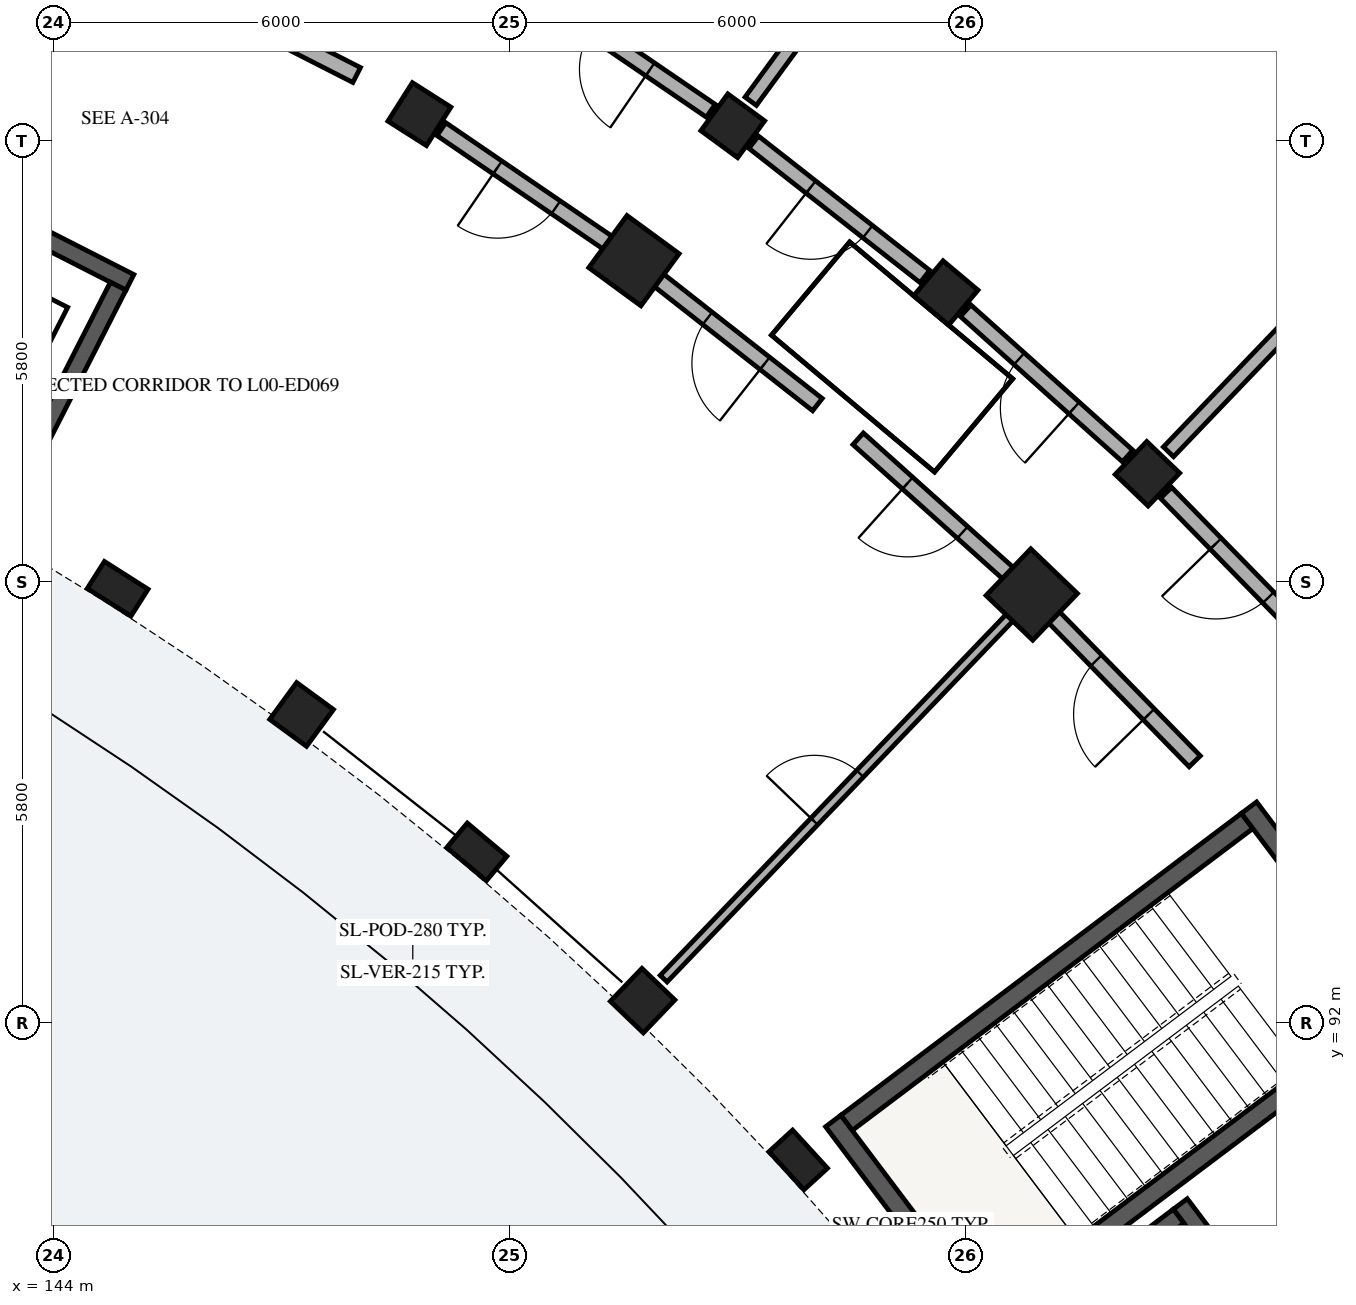
"""IFC4 building model, lengths in metres.
Left out: names, types, materials, properties, quantities, classifications, styles, units other than length and angle.
Written with IfcOpenShell. Run it as: python <this file> out.ifc"""

import sys

from ifc_helpers import new_model, si_unit, direction, frame, frame_2d, origin, origin_2d, place, context, subcontext, project, spatial, rectangle, extrude, element, fill, save


model = new_model("IFC4")
c1 = context("Model", 3, precision=1e-05, world=origin(), true_north=direction((0.0, 1.0)))
c2 = subcontext(c1, "Body", "Model", "MODEL_VIEW")
j1 = project(units=[si_unit("LENGTHUNIT", "METRE"), si_unit("PLANEANGLEUNIT", "RADIAN")], contexts=[c1])
p1 = place(None, origin())
s1 = spatial("IfcSite", under=j1, at=p1, CompositionType="ELEMENT")
p2 = place(p1, origin())
s2 = spatial("IfcBuilding", under=s1, at=p2, CompositionType="ELEMENT")
p3 = place(p2, origin())
s3 = spatial("IfcBuildingStorey", under=s2, at=p3, CompositionType="ELEMENT", Elevation=0.0)
p4 = place(p3, frame((159.707, 94.658, 0.0), z_axis=(0.0, 0.0, 1.0), x_axis=(-0.798639633744, -0.601809550782, 0.0)))
e1 = element("IfcWall", 1, at=p4, inside=s3, PredefinedType="SHEAR", context=c2, shape_type="SweptSolid", body=[
    extrude(rectangle(XDim=6.6, YDim=0.25, at=frame_2d((3.3, 0.0))), origin(), (0.0, 0.0, 1.0), 4.48),
])
p5 = place(p3, frame((154.261, 90.711, 0.0), z_axis=(0.0, 0.0, 1.0), x_axis=(0.601825826579, -0.798627368967, 0.0)))
e2 = element("IfcWall", 2, at=p5, inside=s3, PredefinedType="SHEAR", context=c2, shape_type="SweptSolid", body=[
    extrude(rectangle(XDim=3.42, YDim=0.25, at=frame_2d((1.71, 0.0))), origin(), (0.0, 0.0, 1.0), 4.48),
])
p6 = place(p3, frame((159.731, 94.833, 0.0), z_axis=(0.0, 0.0, 1.0), x_axis=(0.601814606132, -0.798635824294, 0.0)))
e3 = element("IfcWall", 3, at=p6, inside=s3, PredefinedType="SHEAR", context=c2, shape_type="SweptSolid", body=[
    extrude(rectangle(XDim=3.42, YDim=0.25, at=frame_2d((1.71, 0.0))), origin(), (0.0, 0.0, 1.0), 4.48),
])
p7 = place(p3, frame((161.615, 92.126, 0.0), z_axis=(0.0, 0.0, 1.0), x_axis=(-0.798639633744, -0.601809550782, 0.0)))
e4 = element("IfcWall", 4, at=p7, inside=s3, PredefinedType="SHEAR", context=c2, shape_type="SweptSolid", body=[
    extrude(rectangle(XDim=6.6, YDim=0.25, at=frame_2d((3.3, 0.0))), origin(), (0.0, 0.0, 1.0), 4.48),
])
p8 = place(p7, frame((0.22, 0.0, 0.0)))
e5 = element("IfcOpeningElement", 5, at=p8, cuts=e4, PredefinedType="OPENING", context=c2, shape_type="SweptSolid", body=[
    extrude(rectangle(XDim=1.05, YDim=2.15, at=frame_2d((0.525, 1.075))), frame((0.0, 0.135, 0.0), z_axis=(0.0, -1.0, 0.0), x_axis=(1.0, 0.0, 0.0)), (0.0, 0.0, 1.0), 0.27),
])
p9 = place(p3, frame((158.827, 89.619, 0.0), z_axis=(0.0, 0.0, 1.0), x_axis=(0.601819781152, -0.798631924615, 0.0)))
e6 = element("IfcWall", 6, at=p9, inside=s3, PredefinedType="SHEAR", context=c2, shape_type="SweptSolid", body=[
    extrude(rectangle(XDim=3.26, YDim=0.23, at=frame_2d((1.63, 0.0))), origin(), (0.0, 0.0, 1.0), 4.48),
])
p10 = place(p9, frame((0.9, 0.0, 0.0)))
e7 = element("IfcOpeningElement", 7, at=p10, cuts=e6, PredefinedType="OPENING", context=c2, shape_type="SweptSolid", body=[
    extrude(rectangle(XDim=1.1, YDim=2.15, at=frame_2d((0.55, 1.075))), frame((0.0, 0.125, 0.0), z_axis=(0.0, -1.0, 0.0), x_axis=(1.0, 0.0, 0.0)), (0.0, 0.0, 1.0), 0.25),
])
p11 = place(p3, frame((158.805, 89.458, 0.0), z_axis=(0.0, 0.0, 1.0), x_axis=(-0.798608971494, -0.601850239387, 0.0)))
e8 = element("IfcWall", 8, at=p11, inside=s3, PredefinedType="SHEAR", context=c2, shape_type="SweptSolid", body=[
    extrude(rectangle(XDim=2.7, YDim=0.23, at=frame_2d((1.35, 0.0))), origin(), (0.0, 0.0, 1.0), 4.48),
])
p12 = place(p3, frame((142.103, 103.224, 0.0), z_axis=(0.0, 0.0, 1.0), x_axis=(0.891001200497, -0.454000947921, 0.0)))
e9 = element("IfcWall", 9, at=p12, inside=s3, PredefinedType="SHEAR", context=c2, shape_type="SweptSolid", body=[
    extrude(rectangle(XDim=3.26, YDim=0.23, at=frame_2d((1.63, 0.0))), origin(), (0.0, 0.0, 1.0), 4.48),
])
p13 = place(p12, frame((0.9, 0.0, 0.0)))
e10 = element("IfcOpeningElement", 10, at=p13, cuts=e9, PredefinedType="OPENING", context=c2, shape_type="SweptSolid", body=[
    extrude(rectangle(XDim=1.0, YDim=2.15, at=frame_2d((0.5, 1.075))), frame((0.0, 0.125, 0.0), z_axis=(0.0, -1.0, 0.0), x_axis=(1.0, 0.0, 0.0)), (0.0, 0.0, 1.0), 0.25),
])
p14 = place(p3, frame((144.853, 101.694, 0.0), z_axis=(0.0, 0.0, 1.0), x_axis=(-0.454036857101, -0.890982902414, 0.0)))
e11 = element("IfcWall", 11, at=p14, inside=s3, PredefinedType="SHEAR", context=c2, shape_type="SweptSolid", body=[
    extrude(rectangle(XDim=2.7, YDim=0.23, at=frame_2d((1.35, 0.0))), origin(), (0.0, 0.0, 1.0), 4.48),
])
p15 = place(p3, frame((153.801, 90.198, 0.0), z_axis=(0.0, 0.0, 1.0), x_axis=(0.73793204255, 0.674875025896, 0.0)))
e12 = element("IfcColumn", 12, at=p15, inside=s3, PredefinedType="PILASTER", context=c2, shape_type="SweptSolid", body=[
    extrude(rectangle(XDim=0.42, YDim=0.68, at=origin_2d()), origin(), (0.0, 0.0, 1.0), 4.485),
])
p16 = place(p3, frame((151.753, 92.294, 0.0), z_axis=(0.0, 0.0, 1.0), x_axis=(0.691863164029, 0.722028643656, 0.0)))
e13 = element("IfcColumn", 13, at=p16, inside=s3, PredefinedType="COLUMN", context=c2, shape_type="SweptSolid", body=[
    extrude(rectangle(XDim=0.6, YDim=0.6, at=origin_2d()), origin(), (0.0, 0.0, 1.0), 4.485),
])
p17 = place(p3, frame((156.873, 97.637, 0.0), z_axis=(0.0, 0.0, 1.0), x_axis=(0.691863164029, 0.722028643656, 0.0)))
e14 = element("IfcColumn", 14, at=p17, inside=s3, PredefinedType="COLUMN", context=c2, shape_type="SweptSolid", body=[
    extrude(rectangle(XDim=0.85, YDim=0.85, at=origin_2d()), origin(), (0.0, 0.0, 1.0), 4.485),
])
p18 = place(p3, frame((158.395, 99.226, 0.0), z_axis=(0.0, 0.0, 1.0), x_axis=(0.691863164029, 0.722028643656, 0.0)))
e15 = element("IfcColumn", 15, at=p18, inside=s3, PredefinedType="COLUMN", context=c2, shape_type="SweptSolid", body=[
    extrude(rectangle(XDim=0.6, YDim=0.6, at=origin_2d()), origin(), (0.0, 0.0, 1.0), 4.485),
])
p19 = place(p3, frame((149.572, 94.251, 0.0), z_axis=(0.0, 0.0, 1.0), x_axis=(0.642787582947, 0.766044465556, 0.0)))
e16 = element("IfcColumn", 16, at=p19, inside=s3, PredefinedType="PILASTER", context=c2, shape_type="SweptSolid", body=[
    extrude(rectangle(XDim=0.42, YDim=0.68, at=origin_2d()), origin(), (0.0, 0.0, 1.0), 4.485),
])
for number, where, z_axis, x_axis in (
    (17, (155.743, 101.605, 0.0), (0.0, 0.0, 1.0), (0.643, 0.766, 0.0)),
    (18, (147.266, 96.059, 0.0), (0.0, 0.0, 1.0), (0.591, 0.807, 0.0)),
):
    element("IfcColumn", number, at=place(p3, frame(where, z_axis=z_axis, x_axis=x_axis)), inside=s3, PredefinedType="COLUMN", context=c2, shape_type="SweptSolid", body=[
        extrude(rectangle(XDim=0.6, YDim=0.6, at=origin_2d()), origin(), (0.0, 0.0, 1.0), 4.485),
    ])
p20 = place(p3, frame((151.639, 102.029, 0.0), z_axis=(0.0, 0.0, 1.0), x_axis=(0.590918572221, 0.806731207407, 0.0)))
e19 = element("IfcColumn", 19, at=p20, inside=s3, PredefinedType="COLUMN", context=c2, shape_type="SweptSolid", body=[
    extrude(rectangle(XDim=0.85, YDim=0.85, at=origin_2d()), origin(), (0.0, 0.0, 1.0), 4.485),
])
p21 = place(p3, frame((152.939, 103.804, 0.0), z_axis=(0.0, 0.0, 1.0), x_axis=(0.590918572221, 0.806731207407, 0.0)))
e20 = element("IfcColumn", 20, at=p21, inside=s3, PredefinedType="COLUMN", context=c2, shape_type="SweptSolid", body=[
    extrude(rectangle(XDim=0.6, YDim=0.6, at=origin_2d()), origin(), (0.0, 0.0, 1.0), 4.485),
])
p22 = place(p3, frame((144.847, 97.712, 0.0), z_axis=(0.0, 0.0, 1.0), x_axis=(0.536481544469, 0.843912052553, 0.0)))
e21 = element("IfcColumn", 21, at=p22, inside=s3, PredefinedType="PILASTER", context=c2, shape_type="SweptSolid", body=[
    extrude(rectangle(XDim=0.42, YDim=0.68, at=origin_2d()), origin(), (0.0, 0.0, 1.0), 4.485),
])
p23 = place(p3, frame((148.817, 103.957, 0.0), z_axis=(0.0, 0.0, 1.0), x_axis=(0.536481544469, 0.843912052553, 0.0)))
e22 = element("IfcColumn", 22, at=p23, inside=s3, PredefinedType="COLUMN", context=c2, shape_type="SweptSolid", body=[
    extrude(rectangle(XDim=0.6, YDim=0.6, at=origin_2d()), origin(), (0.0, 0.0, 1.0), 4.485),
])
p24 = place(p3, frame((162.0, 103.377, 0.0), z_axis=(0.0, 0.0, 1.0), x_axis=(-0.744452648125, 0.667675261411, 0.0)))
e23 = element("IfcWall", 23, at=p24, inside=s3, PredefinedType="SOLIDWALL", context=c2, shape_type="SweptSolid", body=[
    extrude(rectangle(XDim=3.476, YDim=0.27, at=frame_2d((1.738, 0.0))), origin(), (0.0, 0.0, 1.0), 3.755),
])
p25 = place(p24, frame((0.978, 0.0, 0.55)))
e24 = element("IfcOpeningElement", 24, at=p25, cuts=e23, PredefinedType="OPENING", context=c2, shape_type="SweptSolid", body=[
    extrude(rectangle(XDim=1.52, YDim=1.485, at=frame_2d((0.76, 0.743))), frame((0.0, 0.145, 0.0), z_axis=(0.0, -1.0, 0.0), x_axis=(1.0, 0.0, 0.0)), (0.0, 0.0, 1.0), 0.29),
])
p26 = place(p3, frame((143.625, 106.696, 0.0), z_axis=(0.0, 0.0, 1.0), x_axis=(0.891003372311, -0.453996685595, 0.0)))
e25 = element("IfcWall", 25, at=p26, inside=s3, PredefinedType="PARTITIONING", context=c2, shape_type="SweptSolid", body=[
    extrude(rectangle(XDim=4.9, YDim=0.22, at=frame_2d((2.45, 0.0))), origin(), (0.0, 0.0, 1.0), 3.74),
])
p27 = place(p26, frame((1.95, 0.0, 0.0)))
e26 = element("IfcOpeningElement", 26, at=p27, cuts=e25, PredefinedType="OPENING", context=c2, shape_type="SweptSolid", body=[
    extrude(rectangle(XDim=0.98, YDim=2.14, at=frame_2d((0.49, 1.07))), frame((0.0, 0.12, 0.0), z_axis=(0.0, -1.0, 0.0), x_axis=(1.0, 0.0, 0.0)), (0.0, 0.0, 1.0), 0.24),
])
p28 = place(p3, frame((160.641, 96.927, 0.0), z_axis=(0.0, 0.0, 1.0), x_axis=(-0.698787219683, 0.715329589496, 0.0)))
e27 = element("IfcWall", 27, at=p28, inside=s3, PredefinedType="PARTITIONING", context=c2, shape_type="SweptSolid", body=[
    extrude(rectangle(XDim=2.863, YDim=0.205, at=frame_2d((1.432, 0.0))), origin(), (0.0, 0.0, 1.0), 3.1),
])
p29 = place(p28, frame((0.937, 0.0, 0.0)))
e28 = element("IfcOpeningElement", 28, at=p29, cuts=e27, PredefinedType="OPENING", context=c2, shape_type="SweptSolid", body=[
    extrude(rectangle(XDim=0.99, YDim=2.16, at=frame_2d((0.495, 1.08))), frame((0.0, 0.113, 0.0), z_axis=(0.0, -1.0, 0.0), x_axis=(1.0, 0.0, 0.0)), (0.0, 0.0, 1.0), 0.225),
])
p30 = place(p3, frame((159.017, 95.443, 0.0), z_axis=(0.0, 0.0, 1.0), x_axis=(-0.698840007829, 0.715278018296, 0.0)))
e29 = element("IfcWall", 29, at=p30, inside=s3, PredefinedType="PARTITIONING", context=c2, shape_type="SweptSolid", body=[
    extrude(rectangle(XDim=2.718, YDim=0.205, at=frame_2d((1.359, 0.0))), origin(), (0.0, 0.0, 1.0), 3.1),
])
p31 = place(p30, frame((0.864, 0.0, 0.0)))
e30 = element("IfcOpeningElement", 30, at=p31, cuts=e29, PredefinedType="OPENING", context=c2, shape_type="SweptSolid", body=[
    extrude(rectangle(XDim=0.99, YDim=2.16, at=frame_2d((0.495, 1.08))), frame((0.0, 0.113, 0.0), z_axis=(0.0, -1.0, 0.0), x_axis=(1.0, 0.0, 0.0)), (0.0, 0.0, 1.0), 0.225),
])
p32 = place(p3, frame((158.672, 99.514, 0.0), z_axis=(0.0, 0.0, 1.0), x_axis=(0.691855720025, 0.722035776585, 0.0)))
e31 = element("IfcWall", 31, at=p32, inside=s3, PredefinedType="PARTITIONING", context=c2, shape_type="SweptSolid", body=[
    extrude(rectangle(XDim=4.7, YDim=0.185, at=frame_2d((2.35, 0.0))), origin(), (0.0, 0.0, 1.0), 3.1),
])
p33 = place(p3, frame((152.03, 92.583, 0.0), z_axis=(0.0, 0.0, 1.0), x_axis=(0.691872422458, 0.722019771919, 0.0)))
e32 = element("IfcWall", 32, at=p33, inside=s3, PredefinedType="PARTITIONING", context=c2, shape_type="SweptSolid", body=[
    extrude(rectangle(XDim=6.6, YDim=0.125, at=frame_2d((3.3, 0.0))), origin(), (0.0, 0.0, 1.0), 3.1),
])
p34 = place(p33, frame((2.865, 0.0, 0.0)))
e33 = element("IfcOpeningElement", 33, at=p34, cuts=e32, PredefinedType="OPENING", context=c2, shape_type="SweptSolid", body=[
    extrude(rectangle(XDim=0.87, YDim=2.08, at=frame_2d((0.435, 1.04))), frame((0.0, 0.073, 0.0), z_axis=(0.0, -1.0, 0.0), x_axis=(1.0, 0.0, 0.0)), (0.0, 0.0, 1.0), 0.145),
])
p35 = place(p3, frame((158.135, 99.459, 0.0), z_axis=(0.0, 0.0, 1.0), x_axis=(-0.744433521088, 0.667696587291, 0.0)))
e34 = element("IfcWall", 34, at=p35, inside=s3, PredefinedType="PARTITIONING", context=c2, shape_type="SweptSolid", body=[
    extrude(rectangle(XDim=2.863, YDim=0.205, at=frame_2d((1.432, 0.0))), origin(), (0.0, 0.0, 1.0), 3.1),
])
p36 = place(p35, frame((0.947, 0.0, 0.0)))
e35 = element("IfcOpeningElement", 35, at=p36, cuts=e34, PredefinedType="OPENING", context=c2, shape_type="SweptSolid", body=[
    extrude(rectangle(XDim=0.97, YDim=2.15, at=frame_2d((0.485, 1.075))), frame((0.0, 0.113, 0.0), z_axis=(0.0, -1.0, 0.0), x_axis=(1.0, 0.0, 0.0)), (0.0, 0.0, 1.0), 0.225),
])
p37 = place(p3, frame((156.613, 97.871, 0.0), z_axis=(0.0, 0.0, 1.0), x_axis=(-0.744418559135, 0.667713268413, 0.0)))
e36 = element("IfcWall", 36, at=p37, inside=s3, PredefinedType="PARTITIONING", context=c2, shape_type="SweptSolid", body=[
    extrude(rectangle(XDim=2.718, YDim=0.205, at=frame_2d((1.359, 0.0))), origin(), (0.0, 0.0, 1.0), 3.1),
])
p38 = place(p37, frame((0.874, 0.0, 0.0)))
e37 = element("IfcOpeningElement", 37, at=p38, cuts=e36, PredefinedType="OPENING", context=c2, shape_type="SweptSolid", body=[
    extrude(rectangle(XDim=0.97, YDim=2.15, at=frame_2d((0.485, 1.075))), frame((0.0, 0.113, 0.0), z_axis=(0.0, -1.0, 0.0), x_axis=(1.0, 0.0, 0.0)), (0.0, 0.0, 1.0), 0.225),
])
p39 = place(p3, frame((155.467, 101.821, 0.0), z_axis=(0.0, 0.0, 1.0), x_axis=(-0.786806323554, 0.617199975061, 0.0)))
e38 = element("IfcWall", 38, at=p39, inside=s3, PredefinedType="PARTITIONING", context=c2, shape_type="SweptSolid", body=[
    extrude(rectangle(XDim=2.863, YDim=0.205, at=frame_2d((1.432, 0.0))), origin(), (0.0, 0.0, 1.0), 3.1),
])
p40 = place(p39, frame((0.957, 0.0, 0.0)))
e39 = element("IfcOpeningElement", 39, at=p40, cuts=e38, PredefinedType="OPENING", context=c2, shape_type="SweptSolid", body=[
    extrude(rectangle(XDim=0.95, YDim=2.13, at=frame_2d((0.475, 1.065))), frame((0.0, 0.113, 0.0), z_axis=(0.0, -1.0, 0.0), x_axis=(1.0, 0.0, 0.0)), (0.0, 0.0, 1.0), 0.225),
])
p41 = place(p3, frame((154.053, 100.135, 0.0), z_axis=(0.0, 0.0, 1.0), x_axis=(-0.786835457019, 0.617162833924, 0.0)))
e40 = element("IfcWall", 40, at=p41, inside=s3, PredefinedType="PARTITIONING", context=c2, shape_type="SweptSolid", body=[
    extrude(rectangle(XDim=2.718, YDim=0.205, at=frame_2d((1.359, 0.0))), origin(), (0.0, 0.0, 1.0), 3.1),
])
p42 = place(p41, frame((0.879, 0.0, 0.0)))
e41 = element("IfcOpeningElement", 41, at=p42, cuts=e40, PredefinedType="OPENING", context=c2, shape_type="SweptSolid", body=[
    extrude(rectangle(XDim=0.96, YDim=2.1, at=frame_2d((0.48, 1.05))), frame((0.0, 0.113, 0.0), z_axis=(0.0, -1.0, 0.0), x_axis=(1.0, 0.0, 0.0)), (0.0, 0.0, 1.0), 0.225),
])
p43 = place(p3, frame((153.176, 104.126, 0.0), z_axis=(0.0, 0.0, 1.0), x_axis=(0.590910940129, 0.806736797745, 0.0)))
e42 = element("IfcWall", 42, at=p43, inside=s3, PredefinedType="PARTITIONING", context=c2, shape_type="SweptSolid", body=[
    extrude(rectangle(XDim=4.7, YDim=0.185, at=frame_2d((2.35, 0.0))), origin(), (0.0, 0.0, 1.0), 3.1),
])
p44 = place(p3, frame((152.65, 104.001, 0.0), z_axis=(0.0, 0.0, 1.0), x_axis=(-0.825779671787, 0.563992848947, 0.0)))
e43 = element("IfcWall", 43, at=p44, inside=s3, PredefinedType="PARTITIONING", context=c2, shape_type="SweptSolid", body=[
    extrude(rectangle(XDim=2.863, YDim=0.205, at=frame_2d((1.432, 0.0))), origin(), (0.0, 0.0, 1.0), 3.1),
])
p45 = place(p44, frame((0.967, 0.0, 0.0)))
e44 = element("IfcOpeningElement", 44, at=p45, cuts=e43, PredefinedType="OPENING", context=c2, shape_type="SweptSolid", body=[
    extrude(rectangle(XDim=0.93, YDim=2.12, at=frame_2d((0.465, 1.06))), frame((0.0, 0.113, 0.0), z_axis=(0.0, -1.0, 0.0), x_axis=(1.0, 0.0, 0.0)), (0.0, 0.0, 1.0), 0.225),
])
p46 = place(p3, frame((151.35, 102.226, 0.0), z_axis=(0.0, 0.0, 1.0), x_axis=(-0.825752009056, 0.56403334967, 0.0)))
e45 = element("IfcWall", 45, at=p46, inside=s3, PredefinedType="PARTITIONING", context=c2, shape_type="SweptSolid", body=[
    extrude(rectangle(XDim=2.718, YDim=0.205, at=frame_2d((1.359, 0.0))), origin(), (0.0, 0.0, 1.0), 3.1),
])
p47 = place(p46, frame((0.894, 0.0, 0.0)))
e46 = element("IfcOpeningElement", 46, at=p47, cuts=e45, PredefinedType="OPENING", context=c2, shape_type="SweptSolid", body=[
    extrude(rectangle(XDim=0.93, YDim=2.12, at=frame_2d((0.465, 1.06))), frame((0.0, 0.113, 0.0), z_axis=(0.0, -1.0, 0.0), x_axis=(1.0, 0.0, 0.0)), (0.0, 0.0, 1.0), 0.225),
])
p48 = place(p29, origin())
e47 = element("IfcDoor", 47, at=p48, inside=s3, OperationType="SINGLE_SWING_RIGHT", PredefinedType="DOOR", context=c2, shape_type="SweptSolid", body=[
    extrude(rectangle(XDim=0.99, YDim=2.16, at=frame_2d((0.495, 1.08))), frame((0.0, 0.025, 0.0), z_axis=(0.0, -1.0, 0.0), x_axis=(1.0, 0.0, 0.0)), (0.0, 0.0, 1.0), 0.05),
])
fill(e28, e47)
p49 = place(p31, origin())
e48 = element("IfcDoor", 48, at=p49, inside=s3, OperationType="SINGLE_SWING_LEFT", PredefinedType="DOOR", context=c2, shape_type="SweptSolid", body=[
    extrude(rectangle(XDim=0.99, YDim=2.16, at=frame_2d((0.495, 1.08))), frame((0.0, 0.025, 0.0), z_axis=(0.0, -1.0, 0.0), x_axis=(1.0, 0.0, 0.0)), (0.0, 0.0, 1.0), 0.05),
])
fill(e30, e48)
p50 = place(p34, origin())
e49 = element("IfcDoor", 49, at=p50, inside=s3, OperationType="SINGLE_SWING_LEFT", PredefinedType="DOOR", context=c2, shape_type="SweptSolid", body=[
    extrude(rectangle(XDim=0.87, YDim=2.08, at=frame_2d((0.435, 1.04))), frame((0.0, 0.025, 0.0), z_axis=(0.0, -1.0, 0.0), x_axis=(1.0, 0.0, 0.0)), (0.0, 0.0, 1.0), 0.05),
])
fill(e33, e49)
p51 = place(p36, origin())
e50 = element("IfcDoor", 50, at=p51, inside=s3, OperationType="SINGLE_SWING_LEFT", PredefinedType="DOOR", context=c2, shape_type="SweptSolid", body=[
    extrude(rectangle(XDim=0.97, YDim=2.15, at=frame_2d((0.485, 1.075))), frame((0.0, 0.025, 0.0), z_axis=(0.0, -1.0, 0.0), x_axis=(1.0, 0.0, 0.0)), (0.0, 0.0, 1.0), 0.05),
])
fill(e35, e50)
p52 = place(p38, origin())
e51 = element("IfcDoor", 51, at=p52, inside=s3, OperationType="SINGLE_SWING_RIGHT", PredefinedType="DOOR", context=c2, shape_type="SweptSolid", body=[
    extrude(rectangle(XDim=0.97, YDim=2.15, at=frame_2d((0.485, 1.075))), frame((0.0, 0.025, 0.0), z_axis=(0.0, -1.0, 0.0), x_axis=(1.0, 0.0, 0.0)), (0.0, 0.0, 1.0), 0.05),
])
fill(e37, e51)
p53 = place(p40, origin())
e52 = element("IfcDoor", 52, at=p53, inside=s3, OperationType="SINGLE_SWING_RIGHT", PredefinedType="DOOR", context=c2, shape_type="SweptSolid", body=[
    extrude(rectangle(XDim=0.95, YDim=2.13, at=frame_2d((0.475, 1.065))), frame((0.0, 0.025, 0.0), z_axis=(0.0, -1.0, 0.0), x_axis=(1.0, 0.0, 0.0)), (0.0, 0.0, 1.0), 0.05),
])
fill(e39, e52)
p54 = place(p42, origin())
e53 = element("IfcDoor", 53, at=p54, inside=s3, OperationType="SINGLE_SWING_LEFT", PredefinedType="DOOR", context=c2, shape_type="SweptSolid", body=[
    extrude(rectangle(XDim=0.96, YDim=2.1, at=frame_2d((0.48, 1.05))), frame((0.0, 0.025, 0.0), z_axis=(0.0, -1.0, 0.0), x_axis=(1.0, 0.0, 0.0)), (0.0, 0.0, 1.0), 0.05),
])
fill(e41, e53)
p55 = place(p45, origin())
e54 = element("IfcDoor", 54, at=p55, inside=s3, OperationType="SINGLE_SWING_LEFT", PredefinedType="DOOR", context=c2, shape_type="SweptSolid", body=[
    extrude(rectangle(XDim=0.93, YDim=2.12, at=frame_2d((0.465, 1.06))), frame((0.0, 0.025, 0.0), z_axis=(0.0, -1.0, 0.0), x_axis=(1.0, 0.0, 0.0)), (0.0, 0.0, 1.0), 0.05),
])
fill(e44, e54)
p56 = place(p47, origin())
e55 = element("IfcDoor", 55, at=p56, inside=s3, OperationType="SINGLE_SWING_RIGHT", PredefinedType="DOOR", context=c2, shape_type="SweptSolid", body=[
    extrude(rectangle(XDim=0.93, YDim=2.12, at=frame_2d((0.465, 1.06))), frame((0.0, 0.025, 0.0), z_axis=(0.0, -1.0, 0.0), x_axis=(1.0, 0.0, 0.0)), (0.0, 0.0, 1.0), 0.05),
])
fill(e46, e55)
save(model, sys.argv[1])
